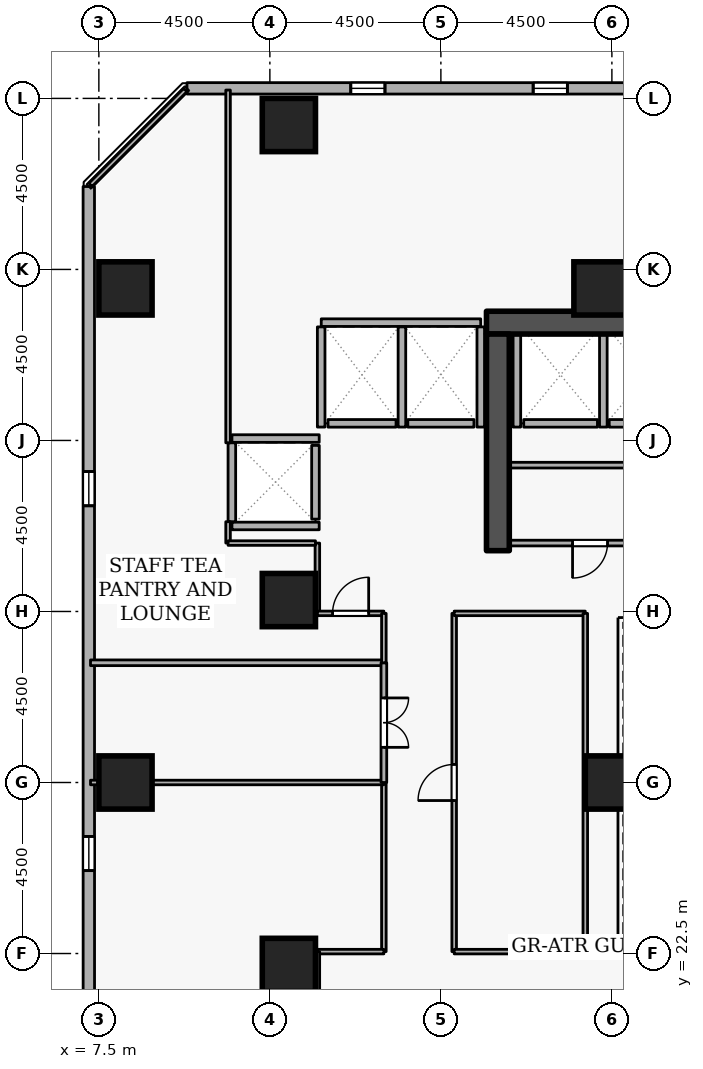
"""IFC4 building model, lengths in metres.
Left out: names, types, materials, properties, quantities, classifications, styles, units other than length and angle.
Written with IfcOpenShell. Run it as: python <this file> out.ifc"""

import sys

from ifc_helpers import new_model, si_unit, direction, frame, frame_2d, origin, origin_2d, place, context, subcontext, project, spatial, rectangle, extrude, element, fill, save


model = new_model("IFC4")
c1 = context("Model", 3, precision=1e-05, world=origin(), true_north=direction((0.0, 1.0)))
c2 = subcontext(c1, "Body", "Model", "MODEL_VIEW")
j1 = project(units=[si_unit("LENGTHUNIT", "METRE"), si_unit("PLANEANGLEUNIT", "RADIAN")], contexts=[c1])
p1 = place(None, origin())
s1 = spatial("IfcSite", under=j1, at=p1, CompositionType="ELEMENT")
p2 = place(p1, origin())
s2 = spatial("IfcBuilding", under=s1, at=p2, CompositionType="ELEMENT")
p3 = place(p2, frame((0.0, 0.0, 60.9)))
s3 = spatial("IfcBuildingStorey", under=s2, at=p3, CompositionType="ELEMENT", Elevation=60.9)
p4 = place(p3, frame((17.7, 39.1, 0.0), z_axis=(0.0, 0.0, 1.0), x_axis=(1.0, 0.0, 0.0)))
e1 = element("IfcWall", 1, at=p4, inside=s3, PredefinedType="SHEAR", context=c2, shape_type="SweptSolid", body=[
    extrude(rectangle(XDim=15.6, YDim=0.6, at=frame_2d((7.8, 0.0))), origin(), (0.0, 0.0, 1.0), 3.6),
])
p5 = place(p3, frame((18.0, 33.1, 0.0), z_axis=(0.0, 0.0, 1.0), x_axis=(0.0, 1.0, 0.0)))
e2 = element("IfcWall", 2, at=p5, inside=s3, PredefinedType="SHEAR", context=c2, shape_type="SweptSolid", body=[
    extrude(rectangle(XDim=5.7, YDim=0.6, at=frame_2d((2.85, 0.0))), origin(), (0.0, 0.0, 1.0), 3.6),
])
for number, where, z_axis, x_axis in (
    (3, (12.5, 44.3, 0.0), (0.0, 0.0, 1.0), (1.0, 0.0, 0.0)),
    (4, (8.2, 27.0, 0.0), (0.0, 0.0, 1.0), (1.0, 0.0, 0.0)),
    (5, (8.2, 40.0, 0.0), (0.0, 0.0, 1.0), (1.0, 0.0, 0.0)),
    (6, (12.5, 22.2, 0.0), (0.0, 0.0, 1.0), (1.0, 0.0, 0.0)),
    (7, (12.5, 31.8, 0.0), (0.0, 0.0, 1.0), (1.0, 0.0, 0.0)),
    (8, (20.7, 40.0, 0.0), (0.0, 0.0, 1.0), (1.0, 0.0, 0.0)),
    (9, (21.0, 27.0, 0.0), (0.0, 0.0, 1.0), (1.0, 0.0, 0.0)),
):
    element("IfcColumn", number, at=place(p3, frame(where, z_axis=z_axis, x_axis=x_axis)), inside=s3, PredefinedType="COLUMN", context=c2, shape_type="SweptSolid", body=[
        extrude(rectangle(XDim=1.4, YDim=1.4, at=origin_2d()), origin(), (0.0, 0.0, 1.0), 3.6),
    ])
p6 = place(p3, frame((46.529, 45.263, 0.0), z_axis=(0.0, 0.0, 1.0), x_axis=(-0.999999998209, 5.985515e-05, 0.0)))
e10 = element("IfcWall", 10, at=p6, inside=s3, PredefinedType="STANDARD", context=c2, shape_type="SweptSolid", body=[
    extrude(rectangle(XDim=36.71, YDim=0.3, at=frame_2d((18.355, 0.0))), origin(), (0.0, 0.0, 1.0), 2.7),
])
p7 = place(p6, frame((2.7, 0.0, 0.72)))
e11 = element("IfcOpeningElement", 11, at=p7, cuts=e10, PredefinedType="OPENING", context=c2, shape_type="SweptSolid", body=[
    extrude(rectangle(XDim=0.9, YDim=1.75, at=frame_2d((0.45, 0.875))), frame((0.0, 0.16, 0.0), z_axis=(0.0, -1.0, 0.0), x_axis=(1.0, 0.0, 0.0)), (0.0, 0.0, 1.0), 0.32),
])
p8 = place(p6, frame((12.3, 0.0, 0.72)))
e12 = element("IfcOpeningElement", 12, at=p8, cuts=e10, PredefinedType="OPENING", context=c2, shape_type="SweptSolid", body=[
    extrude(rectangle(XDim=0.9, YDim=1.75, at=frame_2d((0.45, 0.875))), frame((0.0, 0.16, 0.0), z_axis=(0.0, -1.0, 0.0), x_axis=(1.0, 0.0, 0.0)), (0.0, 0.0, 1.0), 0.32),
])
p9 = place(p6, frame((17.1, 0.0, 0.72)))
e13 = element("IfcOpeningElement", 13, at=p9, cuts=e10, PredefinedType="OPENING", context=c2, shape_type="SweptSolid", body=[
    extrude(rectangle(XDim=0.9, YDim=1.75, at=frame_2d((0.45, 0.875))), frame((0.0, 0.16, 0.0), z_axis=(0.0, -1.0, 0.0), x_axis=(1.0, 0.0, 0.0)), (0.0, 0.0, 1.0), 0.32),
])
p10 = place(p6, frame((26.7, 0.0, 0.72)))
e14 = element("IfcOpeningElement", 14, at=p10, cuts=e10, PredefinedType="OPENING", context=c2, shape_type="SweptSolid", body=[
    extrude(rectangle(XDim=0.9, YDim=1.75, at=frame_2d((0.45, 0.875))), frame((0.0, 0.16, 0.0), z_axis=(0.0, -1.0, 0.0), x_axis=(1.0, 0.0, 0.0)), (0.0, 0.0, 1.0), 0.32),
])
p11 = place(p6, frame((31.5, 0.0, 0.72)))
e15 = element("IfcOpeningElement", 15, at=p11, cuts=e10, PredefinedType="OPENING", context=c2, shape_type="SweptSolid", body=[
    extrude(rectangle(XDim=0.9, YDim=1.75, at=frame_2d((0.45, 0.875))), frame((0.0, 0.16, 0.0), z_axis=(0.0, -1.0, 0.0), x_axis=(1.0, 0.0, 0.0)), (0.0, 0.0, 1.0), 0.32),
])
p12 = place(p3, frame((7.235, 42.681, 0.0), z_axis=(0.0, 0.0, 1.0), x_axis=(5.985515e-05, -0.999999998209, 0.0)))
e16 = element("IfcWall", 16, at=p12, inside=s3, PredefinedType="STANDARD", context=c2, shape_type="SweptSolid", body=[
    extrude(rectangle(XDim=36.71, YDim=0.3, at=frame_2d((18.355, 0.0))), origin(), (0.0, 0.0, 1.0), 2.7),
])
p13 = place(p12, frame((7.5, 0.0, 0.72)))
e17 = element("IfcOpeningElement", 17, at=p13, cuts=e16, PredefinedType="OPENING", context=c2, shape_type="SweptSolid", body=[
    extrude(rectangle(XDim=0.9, YDim=1.75, at=frame_2d((0.45, 0.875))), frame((0.0, 0.16, 0.0), z_axis=(0.0, -1.0, 0.0), x_axis=(1.0, 0.0, 0.0)), (0.0, 0.0, 1.0), 0.32),
])
p14 = place(p12, frame((17.1, 0.0, 0.72)))
e18 = element("IfcOpeningElement", 18, at=p14, cuts=e16, PredefinedType="OPENING", context=c2, shape_type="SweptSolid", body=[
    extrude(rectangle(XDim=0.9, YDim=1.75, at=frame_2d((0.45, 0.875))), frame((0.0, 0.16, 0.0), z_axis=(0.0, -1.0, 0.0), x_axis=(1.0, 0.0, 0.0)), (0.0, 0.0, 1.0), 0.32),
])
p15 = place(p12, frame((21.9, 0.0, 0.72)))
e19 = element("IfcOpeningElement", 19, at=p15, cuts=e16, PredefinedType="OPENING", context=c2, shape_type="SweptSolid", body=[
    extrude(rectangle(XDim=0.9, YDim=1.75, at=frame_2d((0.45, 0.875))), frame((0.0, 0.16, 0.0), z_axis=(0.0, -1.0, 0.0), x_axis=(1.0, 0.0, 0.0)), (0.0, 0.0, 1.0), 0.32),
])
p16 = place(p12, frame((26.7, 0.0, 0.72)))
e20 = element("IfcOpeningElement", 20, at=p16, cuts=e16, PredefinedType="OPENING", context=c2, shape_type="SweptSolid", body=[
    extrude(rectangle(XDim=0.9, YDim=1.75, at=frame_2d((0.45, 0.875))), frame((0.0, 0.16, 0.0), z_axis=(0.0, -1.0, 0.0), x_axis=(1.0, 0.0, 0.0)), (0.0, 0.0, 1.0), 0.32),
])
p17 = place(p3, frame((22.92, 36.45, 0.0), z_axis=(0.0, 0.0, 1.0), x_axis=(-1.0, 0.0, 0.0)))
e21 = element("IfcWall", 21, at=p17, inside=s3, PredefinedType="STANDARD", context=c2, shape_type="SweptSolid", body=[
    extrude(rectangle(XDim=1.99, YDim=0.2, at=frame_2d((0.995, 0.0))), origin(), (0.0, 0.0, 1.0), 3.34),
])
p18 = place(p3, frame((20.62, 36.45, 0.0), z_axis=(0.0, 0.0, 1.0), x_axis=(-1.0, 0.0, 0.0)))
e22 = element("IfcWall", 22, at=p18, inside=s3, PredefinedType="STANDARD", context=c2, shape_type="SweptSolid", body=[
    extrude(rectangle(XDim=1.94, YDim=0.2, at=frame_2d((0.97, 0.0))), origin(), (0.0, 0.0, 1.0), 3.34),
])
p19 = place(p3, frame((17.37, 36.45, 0.0), z_axis=(0.0, 0.0, 1.0), x_axis=(-1.0, 0.0, 0.0)))
e23 = element("IfcWall", 23, at=p19, inside=s3, PredefinedType="STANDARD", context=c2, shape_type="SweptSolid", body=[
    extrude(rectangle(XDim=1.74, YDim=0.2, at=frame_2d((0.87, 0.0))), origin(), (0.0, 0.0, 1.0), 3.34),
])
p20 = place(p3, frame((15.32, 36.45, 0.0), z_axis=(0.0, 0.0, 1.0), x_axis=(-1.0, 0.0, 0.0)))
e24 = element("IfcWall", 24, at=p20, inside=s3, PredefinedType="STANDARD", context=c2, shape_type="SweptSolid", body=[
    extrude(rectangle(XDim=1.79, YDim=0.2, at=frame_2d((0.895, 0.0))), origin(), (0.0, 0.0, 1.0), 3.34),
])
p21 = place(p3, frame((13.2, 33.93, 0.0), z_axis=(0.0, 0.0, 1.0), x_axis=(0.0, 1.0, 0.0)))
e25 = element("IfcWall", 25, at=p21, inside=s3, PredefinedType="STANDARD", context=c2, shape_type="SweptSolid", body=[
    extrude(rectangle(XDim=1.94, YDim=0.2, at=frame_2d((0.97, 0.0))), origin(), (0.0, 0.0, 1.0), 3.34),
])
for number, where, z_axis, x_axis in (
    (26, (20.775, 36.352, 0.0), (0.0, 0.0, 1.0), (0.0, 1.0, 0.0)),
    (27, (18.5, 36.352, 0.0), (0.0, 0.0, 1.0), (0.0, 1.0, 0.0)),
):
    element("IfcWall", number, at=place(p3, frame(where, z_axis=z_axis, x_axis=x_axis)), inside=s3, PredefinedType="STANDARD", context=c2, shape_type="SweptSolid", body=[
        extrude(rectangle(XDim=2.436, YDim=0.2, at=frame_2d((1.218, 0.0))), origin(), (0.0, 0.0, 1.0), 3.34),
    ])
p22 = place(p3, frame((13.352, 39.1, 0.0), z_axis=(0.0, 0.0, 1.0), x_axis=(1.0, 0.0, 0.0)))
e28 = element("IfcWall", 28, at=p22, inside=s3, PredefinedType="STANDARD", context=c2, shape_type="SweptSolid", body=[
    extrude(rectangle(XDim=4.196, YDim=0.2, at=frame_2d((2.098, 0.0))), origin(), (0.0, 0.0, 1.0), 3.34),
])
p23 = place(p3, frame((17.55, 36.352, 0.0), z_axis=(0.0, 0.0, 1.0), x_axis=(0.0, 1.0, 0.0)))
e29 = element("IfcWall", 29, at=p23, inside=s3, PredefinedType="STANDARD", context=c2, shape_type="SweptSolid", body=[
    extrude(rectangle(XDim=2.636, YDim=0.2, at=frame_2d((1.318, 0.0))), origin(), (0.0, 0.0, 1.0), 2.545),
])
for number, where, z_axis, x_axis in (
    (30, (15.475, 36.352, 0.0), (0.0, 0.0, 1.0), (0.0, 1.0, 0.0)),
    (31, (13.35, 36.352, 0.0), (0.0, 0.0, 1.0), (0.0, 1.0, 0.0)),
):
    element("IfcWall", number, at=place(p3, frame(where, z_axis=z_axis, x_axis=x_axis)), inside=s3, PredefinedType="STANDARD", context=c2, shape_type="SweptSolid", body=[
        extrude(rectangle(XDim=2.636, YDim=0.2, at=frame_2d((1.318, 0.0))), origin(), (0.0, 0.0, 1.0), 3.34),
    ])
for number, where, z_axis, x_axis in (
    (32, (11.002, 36.05, 0.0), (0.0, 0.0, 1.0), (1.0, 0.0, 0.0)),
    (33, (11.002, 33.75, 0.0), (0.0, 0.0, 1.0), (1.0, 0.0, 0.0)),
):
    element("IfcWall", number, at=place(p3, frame(where, z_axis=z_axis, x_axis=x_axis)), inside=s3, PredefinedType="STANDARD", context=c2, shape_type="SweptSolid", body=[
        extrude(rectangle(XDim=2.296, YDim=0.2, at=frame_2d((1.148, 0.0))), origin(), (0.0, 0.0, 1.0), 3.34),
    ])
p24 = place(p3, frame((11.0, 33.862, 0.0), z_axis=(0.0, 0.0, 1.0), x_axis=(0.0, 1.0, 0.0)))
e34 = element("IfcWall", 34, at=p24, inside=s3, PredefinedType="STANDARD", context=c2, shape_type="SweptSolid", body=[
    extrude(rectangle(XDim=2.076, YDim=0.2, at=frame_2d((1.038, 0.0))), origin(), (0.0, 0.0, 1.0), 3.34),
])
p25 = place(p3, frame((18.3, 35.35, 0.0), z_axis=(0.0, 0.0, 1.0), x_axis=(1.0, 0.0, 0.0)))
e35 = element("IfcWall", 35, at=p25, inside=s3, PredefinedType="PARTITIONING", context=c2, shape_type="SweptSolid", body=[
    extrude(rectangle(XDim=4.25, YDim=0.15, at=frame_2d((2.125, 0.0))), origin(), (0.0, 0.0, 1.0), 3.34),
])
p26 = place(p3, frame((22.55, 33.3, 0.0), z_axis=(0.0, 0.0, 1.0), x_axis=(-1.0, 0.0, 0.0)))
e36 = element("IfcWall", 36, at=p26, inside=s3, PredefinedType="PARTITIONING", context=c2, shape_type="SweptSolid", body=[
    extrude(rectangle(XDim=4.25, YDim=0.15, at=frame_2d((2.125, 0.0))), origin(), (0.0, 0.0, 1.0), 3.34),
])
p27 = place(p26, frame((1.665, 0.0, 0.0)))
e37 = element("IfcOpeningElement", 37, at=p27, cuts=e36, PredefinedType="OPENING", context=c2, shape_type="SweptSolid", body=[
    extrude(rectangle(XDim=0.92, YDim=2.08, at=frame_2d((0.46, 1.04))), frame((0.0, 0.085, 0.0), z_axis=(0.0, -1.0, 0.0), x_axis=(1.0, 0.0, 0.0)), (0.0, 0.0, 1.0), 0.17),
])
p28 = place(p3, frame((15.0, 27.0, 0.0), z_axis=(0.0, 0.0, 1.0), x_axis=(0.0, -1.0, 0.0)))
e38 = element("IfcWall", 38, at=p28, inside=s3, PredefinedType="PARTITIONING", context=c2, shape_type="SweptSolid", body=[
    extrude(rectangle(XDim=4.45, YDim=0.12, at=frame_2d((2.225, 0.0))), origin(), (0.0, 0.0, 1.0), 3.34),
])
p29 = place(p3, frame((15.0, 22.55, 0.0), z_axis=(0.0, 0.0, 1.0), x_axis=(-1.0, 0.0, 0.0)))
e39 = element("IfcWall", 39, at=p29, inside=s3, PredefinedType="PARTITIONING", context=c2, shape_type="SweptSolid", body=[
    extrude(rectangle(XDim=1.75, YDim=0.12, at=frame_2d((0.875, 0.0))), origin(), (0.0, 0.0, 1.0), 3.34),
])
p30 = place(p3, frame((13.25, 22.55, 0.0), z_axis=(0.0, 0.0, 1.0), x_axis=(0.0, -1.0, 0.0)))
e40 = element("IfcWall", 40, at=p30, inside=s3, PredefinedType="PARTITIONING", context=c2, shape_type="SweptSolid", body=[
    extrude(rectangle(XDim=1.85, YDim=0.12, at=frame_2d((0.925, 0.0))), origin(), (0.0, 0.0, 1.0), 3.34),
])
p31 = place(p3, frame((7.28, 27.0, 0.0), z_axis=(0.0, 0.0, 1.0), x_axis=(1.0, 0.0, 0.0)))
e41 = element("IfcWall", 41, at=p31, inside=s3, PredefinedType="PARTITIONING", context=c2, shape_type="SweptSolid", body=[
    extrude(rectangle(XDim=7.72, YDim=0.12, at=frame_2d((3.86, 0.0))), origin(), (0.0, 0.0, 1.0), 2.878),
])
p32 = place(p3, frame((7.28, 30.15, 0.0), z_axis=(0.0, 0.0, 1.0), x_axis=(1.0, 0.0, 0.0)))
e42 = element("IfcWall", 42, at=p32, inside=s3, PredefinedType="PARTITIONING", context=c2, shape_type="SweptSolid", body=[
    extrude(rectangle(XDim=7.72, YDim=0.15, at=frame_2d((3.86, 0.0))), origin(), (0.0, 0.0, 1.0), 3.34),
])
p33 = place(p3, frame((15.0, 30.15, 0.0), z_axis=(0.0, 0.0, 1.0), x_axis=(0.0, -1.0, 0.0)))
e43 = element("IfcWall", 43, at=p33, inside=s3, PredefinedType="PARTITIONING", context=c2, shape_type="SweptSolid", body=[
    extrude(rectangle(XDim=3.15, YDim=0.15, at=frame_2d((1.575, 0.0))), origin(), (0.0, 0.0, 1.0), 3.34),
])
p34 = place(p33, frame((0.925, 0.0, 0.0)))
e44 = element("IfcOpeningElement", 44, at=p34, cuts=e43, PredefinedType="OPENING", context=c2, shape_type="SweptSolid", body=[
    extrude(rectangle(XDim=1.3, YDim=2.12, at=frame_2d((0.65, 1.06))), frame((0.0, 0.085, 0.0), z_axis=(0.0, -1.0, 0.0), x_axis=(1.0, 0.0, 0.0)), (0.0, 0.0, 1.0), 0.17),
])
p35 = place(p3, frame((13.25, 33.3, 0.0), z_axis=(0.0, 0.0, 1.0), x_axis=(0.0, -1.0, 0.0)))
e45 = element("IfcWall", 45, at=p35, inside=s3, PredefinedType="PARTITIONING", context=c2, shape_type="SweptSolid", body=[
    extrude(rectangle(XDim=1.85, YDim=0.12, at=frame_2d((0.925, 0.0))), origin(), (0.0, 0.0, 1.0), 3.34),
])
p36 = place(p3, frame((13.25, 31.45, 0.0), z_axis=(0.0, 0.0, 1.0), x_axis=(1.0, 0.0, 0.0)))
e46 = element("IfcWall", 46, at=p36, inside=s3, PredefinedType="PARTITIONING", context=c2, shape_type="SweptSolid", body=[
    extrude(rectangle(XDim=1.75, YDim=0.12, at=frame_2d((0.875, 0.0))), origin(), (0.0, 0.0, 1.0), 3.34),
])
p37 = place(p36, frame((0.4, 0.0, 0.0)))
e47 = element("IfcOpeningElement", 47, at=p37, cuts=e46, PredefinedType="OPENING", context=c2, shape_type="SweptSolid", body=[
    extrude(rectangle(XDim=0.95, YDim=2.1, at=frame_2d((0.475, 1.05))), frame((0.0, 0.07, 0.0), z_axis=(0.0, -1.0, 0.0), x_axis=(1.0, 0.0, 0.0)), (0.0, 0.0, 1.0), 0.14),
])
p38 = place(p3, frame((15.0, 31.45, 0.0), z_axis=(0.0, 0.0, 1.0), x_axis=(0.0, -1.0, 0.0)))
e48 = element("IfcWall", 48, at=p38, inside=s3, PredefinedType="PARTITIONING", context=c2, shape_type="SweptSolid", body=[
    extrude(rectangle(XDim=1.3, YDim=0.12, at=frame_2d((0.65, 0.0))), origin(), (0.0, 0.0, 1.0), 3.34),
])
p39 = place(p3, frame((7.28, 42.725, 0.0), z_axis=(0.0, 0.0, 1.0), x_axis=(0.707106781187, 0.707106781187, 0.0)))
e49 = element("IfcWall", 49, at=p39, inside=s3, PredefinedType="PARTITIONING", context=c2, shape_type="SweptSolid", body=[
    extrude(rectangle(XDim=3.528, YDim=0.12, at=frame_2d((1.764, 0.0))), origin(), (0.0, 0.0, 1.0), 3.34),
])
p40 = place(p3, frame((10.9, 45.22, 0.0), z_axis=(0.0, 0.0, 1.0), x_axis=(0.0, -1.0, 0.0)))
e50 = element("IfcWall", 50, at=p40, inside=s3, PredefinedType="PARTITIONING", context=c2, shape_type="SweptSolid", body=[
    extrude(rectangle(XDim=9.282, YDim=0.12, at=frame_2d((4.641, 0.0))), origin(), (0.0, 0.0, 1.0), 3.34),
])
p41 = place(p3, frame((10.9, 33.862, 0.0), z_axis=(0.0, 0.0, 1.0), x_axis=(0.0, -1.0, 0.0)))
e51 = element("IfcWall", 51, at=p41, inside=s3, PredefinedType="PARTITIONING", context=c2, shape_type="SweptSolid", body=[
    extrude(rectangle(XDim=0.562, YDim=0.12, at=frame_2d((0.281, 0.0))), origin(), (0.0, 0.0, 1.0), 3.34),
])
p42 = place(p3, frame((10.9, 33.3, 0.0), z_axis=(0.0, 0.0, 1.0), x_axis=(1.0, 0.0, 0.0)))
e52 = element("IfcWall", 52, at=p42, inside=s3, PredefinedType="PARTITIONING", context=c2, shape_type="SweptSolid", body=[
    extrude(rectangle(XDim=2.3, YDim=0.12, at=frame_2d((1.15, 0.0))), origin(), (0.0, 0.0, 1.0), 3.34),
])
p43 = place(p3, frame((16.85, 22.55, 0.0), z_axis=(0.0, 0.0, 1.0), x_axis=(0.0, 1.0, 0.0)))
e53 = element("IfcWall", 53, at=p43, inside=s3, PredefinedType="PARTITIONING", context=c2, shape_type="SweptSolid", body=[
    extrude(rectangle(XDim=8.9, YDim=0.12, at=frame_2d((4.45, 0.0))), origin(), (0.0, 0.0, 1.0), 3.34),
])
p44 = place(p43, frame((3.975, 0.0, 0.0)))
e54 = element("IfcOpeningElement", 54, at=p44, cuts=e53, PredefinedType="OPENING", context=c2, shape_type="SweptSolid", body=[
    extrude(rectangle(XDim=0.95, YDim=2.1, at=frame_2d((0.475, 1.05))), frame((0.0, 0.07, 0.0), z_axis=(0.0, -1.0, 0.0), x_axis=(1.0, 0.0, 0.0)), (0.0, 0.0, 1.0), 0.14),
])
p45 = place(p3, frame((16.85, 31.45, 0.0), z_axis=(0.0, 0.0, 1.0), x_axis=(1.0, 0.0, 0.0)))
e55 = element("IfcWall", 55, at=p45, inside=s3, PredefinedType="PARTITIONING", context=c2, shape_type="SweptSolid", body=[
    extrude(rectangle(XDim=3.45, YDim=0.12, at=frame_2d((1.725, 0.0))), origin(), (0.0, 0.0, 1.0), 3.34),
])
p46 = place(p3, frame((20.3, 31.45, 0.0), z_axis=(0.0, 0.0, 1.0), x_axis=(0.0, -1.0, 0.0)))
e56 = element("IfcWall", 56, at=p46, inside=s3, PredefinedType="PARTITIONING", context=c2, shape_type="SweptSolid", body=[
    extrude(rectangle(XDim=8.9, YDim=0.12, at=frame_2d((4.45, 0.0))), origin(), (0.0, 0.0, 1.0), 3.34),
])
p47 = place(p3, frame((20.3, 22.55, 0.0), z_axis=(0.0, 0.0, 1.0), x_axis=(-1.0, 0.0, 0.0)))
e57 = element("IfcWall", 57, at=p47, inside=s3, PredefinedType="PARTITIONING", context=c2, shape_type="SweptSolid", body=[
    extrude(rectangle(XDim=3.45, YDim=0.12, at=frame_2d((1.725, 0.0))), origin(), (0.0, 0.0, 1.0), 3.34),
])
p48 = place(p10, origin())
e58 = element("IfcWindow", 58, at=p48, inside=s3, PartitioningType="SINGLE_PANEL", PredefinedType="WINDOW", context=c2, shape_type="SweptSolid", body=[
    extrude(rectangle(XDim=0.9, YDim=1.75, at=frame_2d((0.45, 0.875))), frame((0.0, 0.03, 0.0), z_axis=(0.0, -1.0, 0.0), x_axis=(1.0, 0.0, 0.0)), (0.0, 0.0, 1.0), 0.06),
])
fill(e14, e58)
p49 = place(p11, origin())
e59 = element("IfcWindow", 59, at=p49, inside=s3, PartitioningType="SINGLE_PANEL", PredefinedType="WINDOW", context=c2, shape_type="SweptSolid", body=[
    extrude(rectangle(XDim=0.9, YDim=1.75, at=frame_2d((0.45, 0.875))), frame((0.0, 0.03, 0.0), z_axis=(0.0, -1.0, 0.0), x_axis=(1.0, 0.0, 0.0)), (0.0, 0.0, 1.0), 0.06),
])
fill(e15, e59)
p50 = place(p13, origin())
e60 = element("IfcWindow", 60, at=p50, inside=s3, PartitioningType="SINGLE_PANEL", PredefinedType="WINDOW", context=c2, shape_type="SweptSolid", body=[
    extrude(rectangle(XDim=0.9, YDim=1.75, at=frame_2d((0.45, 0.875))), frame((0.0, 0.03, 0.0), z_axis=(0.0, -1.0, 0.0), x_axis=(1.0, 0.0, 0.0)), (0.0, 0.0, 1.0), 0.06),
])
fill(e17, e60)
p51 = place(p14, origin())
e61 = element("IfcWindow", 61, at=p51, inside=s3, PartitioningType="SINGLE_PANEL", PredefinedType="WINDOW", context=c2, shape_type="SweptSolid", body=[
    extrude(rectangle(XDim=0.9, YDim=1.75, at=frame_2d((0.45, 0.875))), frame((0.0, 0.03, 0.0), z_axis=(0.0, -1.0, 0.0), x_axis=(1.0, 0.0, 0.0)), (0.0, 0.0, 1.0), 0.06),
])
fill(e18, e61)
p52 = place(p27, origin())
e62 = element("IfcDoor", 62, at=p52, inside=s3, OperationType="SINGLE_SWING_RIGHT", PredefinedType="DOOR", context=c2, shape_type="SweptSolid", body=[
    extrude(rectangle(XDim=0.92, YDim=2.08, at=frame_2d((0.46, 1.04))), frame((0.0, 0.025, 0.0), z_axis=(0.0, -1.0, 0.0), x_axis=(1.0, 0.0, 0.0)), (0.0, 0.0, 1.0), 0.05),
])
fill(e37, e62)
p53 = place(p34, origin())
e63 = element("IfcDoor", 63, at=p53, inside=s3, OperationType="DOUBLE_DOOR_SINGLE_SWING", PredefinedType="DOOR", context=c2, shape_type="SweptSolid", body=[
    extrude(rectangle(XDim=1.3, YDim=2.12, at=frame_2d((0.65, 1.06))), frame((0.0, 0.025, 0.0), z_axis=(0.0, -1.0, 0.0), x_axis=(1.0, 0.0, 0.0)), (0.0, 0.0, 1.0), 0.05),
])
fill(e44, e63)
p54 = place(p37, origin())
e64 = element("IfcDoor", 64, at=p54, inside=s3, OperationType="SINGLE_SWING_RIGHT", PredefinedType="DOOR", context=c2, shape_type="SweptSolid", body=[
    extrude(rectangle(XDim=0.95, YDim=2.1, at=frame_2d((0.475, 1.05))), frame((0.0, 0.025, 0.0), z_axis=(0.0, -1.0, 0.0), x_axis=(1.0, 0.0, 0.0)), (0.0, 0.0, 1.0), 0.05),
])
fill(e47, e64)
p55 = place(p44, origin())
e65 = element("IfcDoor", 65, at=p55, inside=s3, OperationType="SINGLE_SWING_LEFT", PredefinedType="DOOR", context=c2, shape_type="SweptSolid", body=[
    extrude(rectangle(XDim=0.95, YDim=2.1, at=frame_2d((0.475, 1.05))), frame((0.0, 0.025, 0.0), z_axis=(0.0, -1.0, 0.0), x_axis=(1.0, 0.0, 0.0)), (0.0, 0.0, 1.0), 0.05),
])
fill(e54, e65)
save(model, sys.argv[1])
